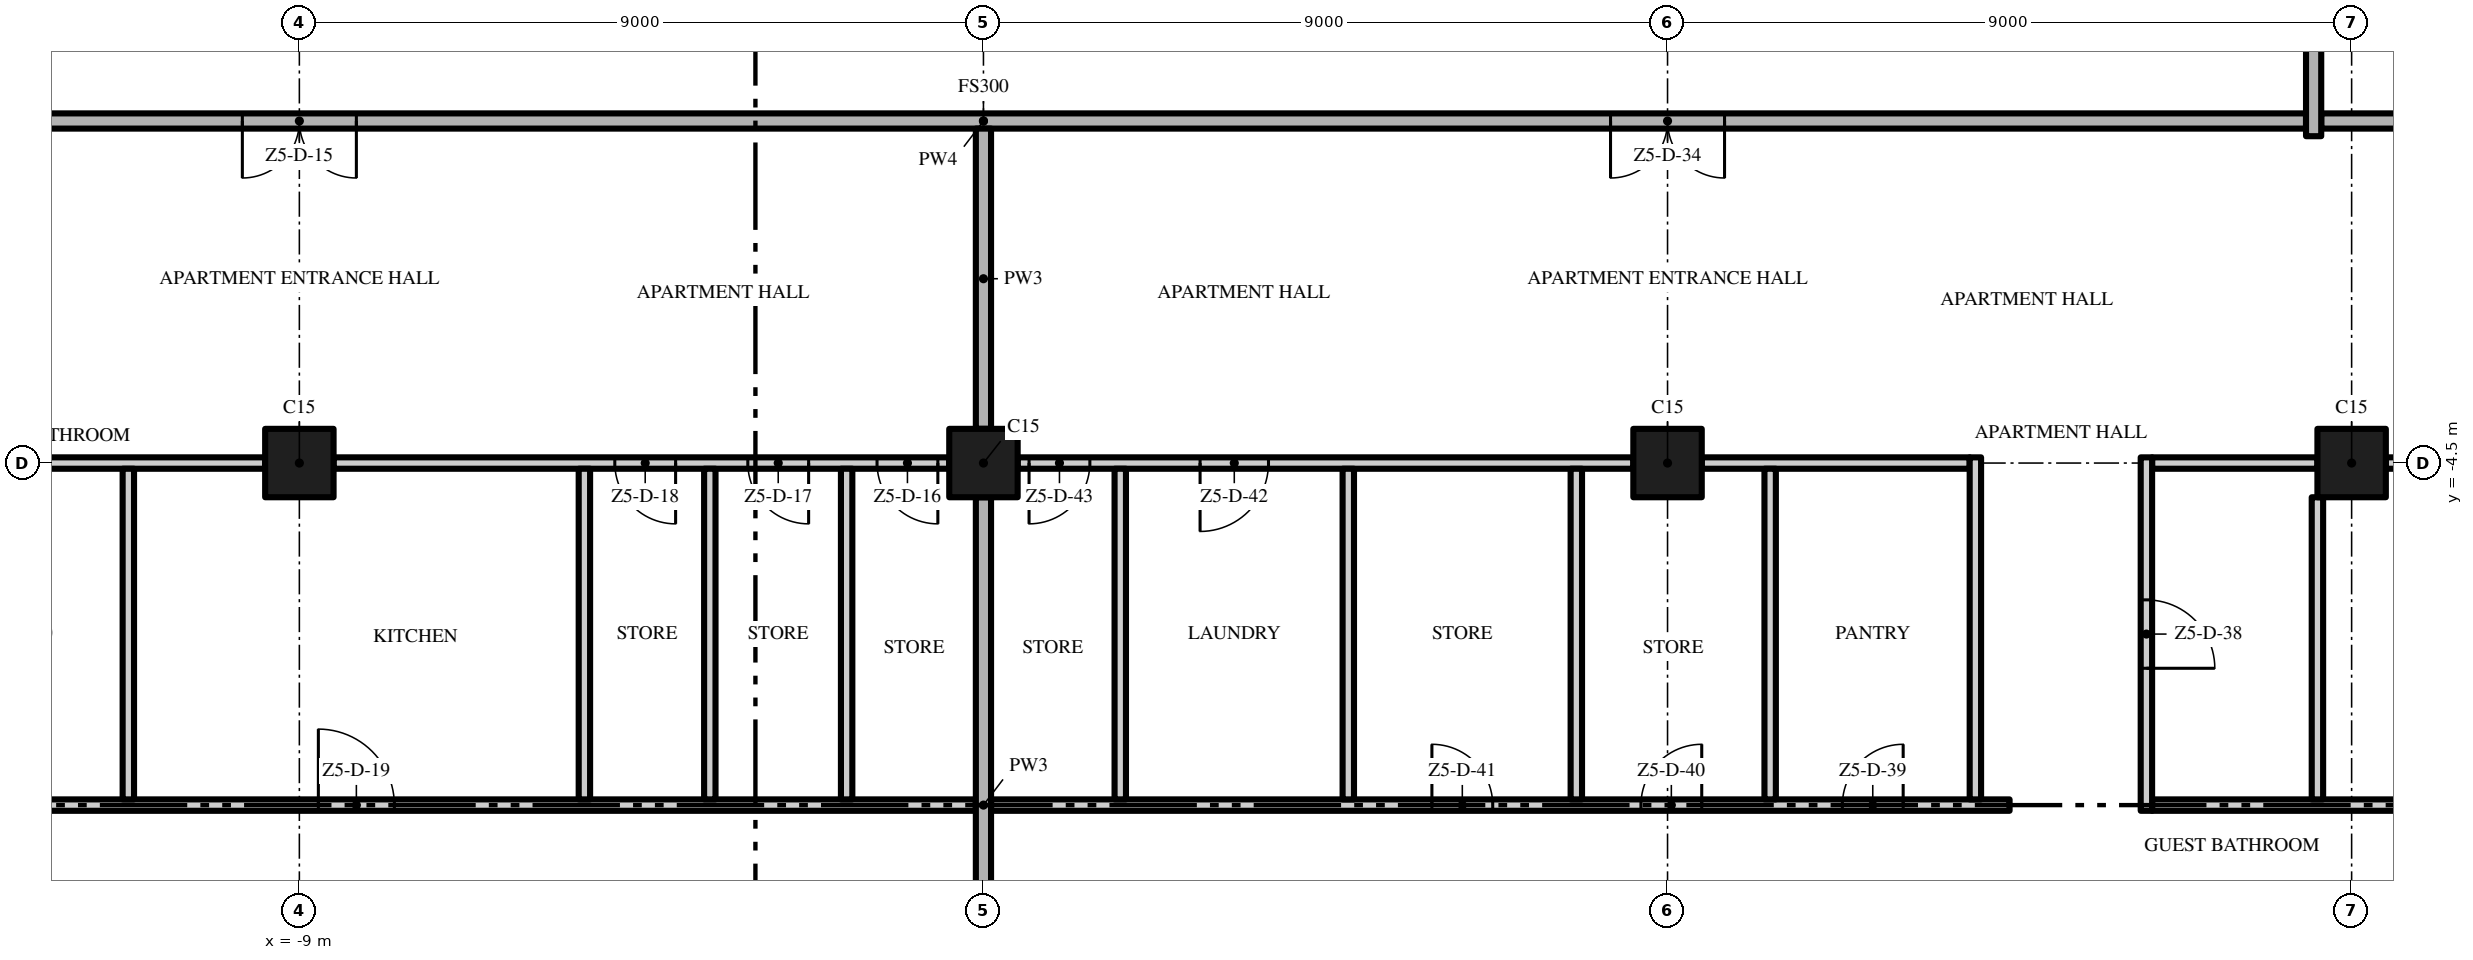
"""IFC4 building model, lengths in metres.
Left out: names, types, materials, properties, quantities, classifications, styles, units other than length and angle.
Written with IfcOpenShell. Run it as: python <this file> out.ifc"""

import sys

from ifc_helpers import new_model, si_unit, direction, frame, frame_2d, origin, origin_2d, place, context, subcontext, project, spatial, rectangle, extrude, element, fill, save


model = new_model("IFC4")
c1 = context("Model", 3, precision=1e-05, world=origin(), true_north=direction((0.0, 1.0)))
c2 = subcontext(c1, "Body", "Model", "MODEL_VIEW")
j1 = project(units=[si_unit("LENGTHUNIT", "METRE"), si_unit("PLANEANGLEUNIT", "RADIAN")], contexts=[c1])
p1 = place(None, origin())
s1 = spatial("IfcSite", under=j1, at=p1, CompositionType="ELEMENT")
p2 = place(p1, origin())
s2 = spatial("IfcBuilding", under=s1, at=p2, CompositionType="ELEMENT")
p3 = place(p2, frame((0.0, 0.0, 276.8)))
s3 = spatial("IfcBuildingStorey", under=s2, at=p3, CompositionType="ELEMENT", Elevation=276.8)
for number, where, z_axis, x_axis in (
    (1, (-9.0, -4.5, 0.0), (0.0, 0.0, 1.0), (1.0, 0.0, 0.0)),
    (2, (0.0, -4.5, 0.0), (0.0, 0.0, 1.0), (1.0, 0.0, 0.0)),
    (3, (18.0, -4.5, 0.0), (0.0, 0.0, 1.0), (1.0, 0.0, 0.0)),
    (4, (9.0, -4.5, 0.0), (0.0, 0.0, 1.0), (1.0, 0.0, 0.0)),
):
    element("IfcColumn", number, at=place(p3, frame(where, z_axis=z_axis, x_axis=x_axis)), inside=s3, PredefinedType="COLUMN", context=c2, shape_type="SweptSolid", body=[
        extrude(rectangle(XDim=0.9, YDim=0.9, at=origin_2d()), origin(), (0.0, 0.0, 1.0), 3.5),
    ])
p4 = place(p3, frame((-13.425, -9.0, 0.0), z_axis=(0.0, 0.0, 1.0), x_axis=(1.0, 0.0, 0.0)))
e5 = element("IfcWall", 5, at=p4, inside=s3, PredefinedType="PARTITIONING", context=c2, shape_type="SweptSolid", body=[
    extrude(rectangle(XDim=13.325, YDim=0.15, at=frame_2d((6.662, 0.0))), origin(), (0.0, 0.0, 1.0), 3.5),
])
p5 = place(p4, frame((4.675, 0.0, 0.0)))
e6 = element("IfcOpeningElement", 6, at=p5, cuts=e5, PredefinedType="OPENING", context=c2, shape_type="SweptSolid", body=[
    extrude(rectangle(XDim=1.0, YDim=2.4, at=frame_2d((0.5, 1.2))), frame((0.0, 0.085, 0.0), z_axis=(0.0, -1.0, 0.0), x_axis=(1.0, 0.0, 0.0)), (0.0, 0.0, 1.0), 0.17),
])
p6 = place(p3, frame((0.1, -9.0, 0.0), z_axis=(0.0, 0.0, 1.0), x_axis=(1.0, 0.0, 0.0)))
e7 = element("IfcWall", 7, at=p6, inside=s3, PredefinedType="PARTITIONING", context=c2, shape_type="SweptSolid", body=[
    extrude(rectangle(XDim=13.4, YDim=0.15, at=frame_2d((6.7, 0.0))), origin(), (0.0, 0.0, 1.0), 3.5),
])
p7 = place(p6, frame((11.2, 0.0, 0.0)))
e8 = element("IfcOpeningElement", 8, at=p7, cuts=e7, PredefinedType="OPENING", context=c2, shape_type="SweptSolid", body=[
    extrude(rectangle(XDim=0.8, YDim=2.0, at=frame_2d((0.4, 1.0))), frame((0.0, 0.085, 0.0), z_axis=(0.0, -1.0, 0.0), x_axis=(1.0, 0.0, 0.0)), (0.0, 0.0, 1.0), 0.17),
])
p8 = place(p6, frame((8.55, 0.0, 0.0)))
e9 = element("IfcOpeningElement", 9, at=p8, cuts=e7, PredefinedType="OPENING", context=c2, shape_type="SweptSolid", body=[
    extrude(rectangle(XDim=0.8, YDim=2.0, at=frame_2d((0.4, 1.0))), frame((0.0, 0.085, 0.0), z_axis=(0.0, -1.0, 0.0), x_axis=(1.0, 0.0, 0.0)), (0.0, 0.0, 1.0), 0.17),
])
p9 = place(p6, frame((5.8, 0.0, 0.0)))
e10 = element("IfcOpeningElement", 10, at=p9, cuts=e7, PredefinedType="OPENING", context=c2, shape_type="SweptSolid", body=[
    extrude(rectangle(XDim=0.8, YDim=2.0, at=frame_2d((0.4, 1.0))), frame((0.0, 0.085, 0.0), z_axis=(0.0, -1.0, 0.0), x_axis=(1.0, 0.0, 0.0)), (0.0, 0.0, 1.0), 0.17),
])
p10 = place(p3, frame((15.375, -9.0, 0.0), z_axis=(0.0, 0.0, 1.0), x_axis=(1.0, 0.0, 0.0)))
e11 = element("IfcWall", 11, at=p10, inside=s3, PredefinedType="PARTITIONING", context=c2, shape_type="SweptSolid", body=[
    extrude(rectangle(XDim=11.325, YDim=0.15, at=frame_2d((5.662, 0.0))), origin(), (0.0, 0.0, 1.0), 3.5),
])
p11 = place(p10, frame((10.325, 0.0, 0.0)))
e12 = element("IfcOpeningElement", 12, at=p11, cuts=e11, PredefinedType="OPENING", context=c2, shape_type="SweptSolid", body=[
    extrude(rectangle(XDim=0.8, YDim=2.0, at=frame_2d((0.4, 1.0))), frame((0.0, 0.085, 0.0), z_axis=(0.0, -1.0, 0.0), x_axis=(1.0, 0.0, 0.0)), (0.0, 0.0, 1.0), 0.17),
])
p12 = place(p3, frame((-13.425, -4.5, 0.0), z_axis=(0.0, 0.0, 1.0), x_axis=(1.0, 0.0, 0.0)))
e13 = element("IfcWall", 13, at=p12, inside=s3, PredefinedType="PARTITIONING", context=c2, shape_type="SweptSolid", body=[
    extrude(rectangle(XDim=3.975, YDim=0.15, at=frame_2d((1.988, 0.0))), origin(), (0.0, 0.0, 1.0), 3.5),
])
p13 = place(p3, frame((-0.45, -4.5, 0.0), z_axis=(0.0, 0.0, 1.0), x_axis=(-1.0, 0.0, 0.0)))
e14 = element("IfcWall", 14, at=p13, inside=s3, PredefinedType="PARTITIONING", context=c2, shape_type="SweptSolid", body=[
    extrude(rectangle(XDim=8.1, YDim=0.15, at=frame_2d((4.05, 0.0))), origin(), (0.0, 0.0, 1.0), 3.5),
])
p14 = place(p13, frame((0.15, 0.0, 0.0)))
e15 = element("IfcOpeningElement", 15, at=p14, cuts=e14, PredefinedType="OPENING", context=c2, shape_type="SweptSolid", body=[
    extrude(rectangle(XDim=0.8, YDim=2.0, at=frame_2d((0.4, 1.0))), frame((0.0, 0.085, 0.0), z_axis=(0.0, -1.0, 0.0), x_axis=(1.0, 0.0, 0.0)), (0.0, 0.0, 1.0), 0.17),
])
p15 = place(p13, frame((1.85, 0.0, 0.0)))
e16 = element("IfcOpeningElement", 16, at=p15, cuts=e14, PredefinedType="OPENING", context=c2, shape_type="SweptSolid", body=[
    extrude(rectangle(XDim=0.8, YDim=2.0, at=frame_2d((0.4, 1.0))), frame((0.0, 0.085, 0.0), z_axis=(0.0, -1.0, 0.0), x_axis=(1.0, 0.0, 0.0)), (0.0, 0.0, 1.0), 0.17),
])
p16 = place(p13, frame((3.6, 0.0, 0.0)))
e17 = element("IfcOpeningElement", 17, at=p16, cuts=e14, PredefinedType="OPENING", context=c2, shape_type="SweptSolid", body=[
    extrude(rectangle(XDim=0.8, YDim=2.0, at=frame_2d((0.4, 1.0))), frame((0.0, 0.085, 0.0), z_axis=(0.0, -1.0, 0.0), x_axis=(1.0, 0.0, 0.0)), (0.0, 0.0, 1.0), 0.17),
])
p17 = place(p3, frame((8.55, -4.5, 0.0), z_axis=(0.0, 0.0, 1.0), x_axis=(-1.0, 0.0, 0.0)))
e18 = element("IfcWall", 18, at=p17, inside=s3, PredefinedType="PARTITIONING", context=c2, shape_type="SweptSolid", body=[
    extrude(rectangle(XDim=8.1, YDim=0.15, at=frame_2d((4.05, 0.0))), origin(), (0.0, 0.0, 1.0), 3.5),
])
p18 = place(p17, frame((4.8, 0.0, 0.0)))
e19 = element("IfcOpeningElement", 19, at=p18, cuts=e18, PredefinedType="OPENING", context=c2, shape_type="SweptSolid", body=[
    extrude(rectangle(XDim=0.9, YDim=2.1, at=frame_2d((0.45, 1.05))), frame((0.0, 0.085, 0.0), z_axis=(0.0, -1.0, 0.0), x_axis=(1.0, 0.0, 0.0)), (0.0, 0.0, 1.0), 0.17),
])
p19 = place(p17, frame((7.15, 0.0, 0.0)))
e20 = element("IfcOpeningElement", 20, at=p19, cuts=e18, PredefinedType="OPENING", context=c2, shape_type="SweptSolid", body=[
    extrude(rectangle(XDim=0.8, YDim=2.0, at=frame_2d((0.4, 1.0))), frame((0.0, 0.085, 0.0), z_axis=(0.0, -1.0, 0.0), x_axis=(1.0, 0.0, 0.0)), (0.0, 0.0, 1.0), 0.17),
])
p20 = place(p3, frame((9.45, -4.5, 0.0), z_axis=(0.0, 0.0, 1.0), x_axis=(1.0, 0.0, 0.0)))
e21 = element("IfcWall", 21, at=p20, inside=s3, PredefinedType="PARTITIONING", context=c2, shape_type="SweptSolid", body=[
    extrude(rectangle(XDim=3.525, YDim=0.15, at=frame_2d((1.762, 0.0))), origin(), (0.0, 0.0, 1.0), 3.5),
])
p21 = place(p3, frame((15.375, -4.5, 0.0), z_axis=(0.0, 0.0, 1.0), x_axis=(1.0, 0.0, 0.0)))
e22 = element("IfcWall", 22, at=p21, inside=s3, PredefinedType="PARTITIONING", context=c2, shape_type="SweptSolid", body=[
    extrude(rectangle(XDim=2.175, YDim=0.15, at=frame_2d((1.087, 0.0))), origin(), (0.0, 0.0, 1.0), 3.5),
])
p22 = place(p3, frame((26.1, -4.5, 0.0), z_axis=(0.0, 0.0, 1.0), x_axis=(-1.0, 0.0, 0.0)))
e23 = element("IfcWall", 23, at=p22, inside=s3, PredefinedType="PARTITIONING", context=c2, shape_type="SweptSolid", body=[
    extrude(rectangle(XDim=7.65, YDim=0.15, at=frame_2d((3.825, 0.0))), origin(), (0.0, 0.0, 1.0), 3.5),
])
p23 = place(p22, frame((1.35, 0.0, 0.0)))
e24 = element("IfcOpeningElement", 24, at=p23, cuts=e23, PredefinedType="OPENING", context=c2, shape_type="SweptSolid", body=[
    extrude(rectangle(XDim=0.8, YDim=2.0, at=frame_2d((0.4, 1.0))), frame((0.0, 0.085, 0.0), z_axis=(0.0, -1.0, 0.0), x_axis=(1.0, 0.0, 0.0)), (0.0, 0.0, 1.0), 0.17),
])
p24 = place(p22, frame((5.05, 0.0, 0.0)))
e25 = element("IfcOpeningElement", 25, at=p24, cuts=e23, PredefinedType="OPENING", context=c2, shape_type="SweptSolid", body=[
    extrude(rectangle(XDim=1.0, YDim=2.4, at=frame_2d((0.5, 1.2))), frame((0.0, 0.085, 0.0), z_axis=(0.0, -1.0, 0.0), x_axis=(1.0, 0.0, 0.0)), (0.0, 0.0, 1.0), 0.17),
])
p25 = place(p3, frame((17.4, 0.0, 0.0), z_axis=(0.0, 0.0, 1.0), x_axis=(-1.0, 0.0, 0.0)))
e26 = element("IfcWall", 26, at=p25, inside=s3, PredefinedType="PARTITIONING", context=c2, shape_type="SweptSolid", body=[
    extrude(rectangle(XDim=34.8, YDim=0.2, at=frame_2d((17.4, 0.0))), origin(), (0.0, 0.0, 1.0), 3.5),
])
p26 = place(p25, frame((25.65, 0.0, 0.0)))
e27 = element("IfcOpeningElement", 27, at=p26, cuts=e26, PredefinedType="OPENING", context=c2, shape_type="SweptSolid", body=[
    extrude(rectangle(XDim=1.5, YDim=2.4, at=frame_2d((0.75, 1.2))), frame((0.0, 0.11, 0.0), z_axis=(0.0, -1.0, 0.0), x_axis=(1.0, 0.0, 0.0)), (0.0, 0.0, 1.0), 0.22),
])
p27 = place(p25, frame((7.65, 0.0, 0.0)))
e28 = element("IfcOpeningElement", 28, at=p27, cuts=e26, PredefinedType="OPENING", context=c2, shape_type="SweptSolid", body=[
    extrude(rectangle(XDim=1.5, YDim=2.4, at=frame_2d((0.75, 1.2))), frame((0.0, 0.11, 0.0), z_axis=(0.0, -1.0, 0.0), x_axis=(1.0, 0.0, 0.0)), (0.0, 0.0, 1.0), 0.22),
])
p28 = place(p3, frame((17.6, 0.0, 0.0), z_axis=(0.0, 0.0, 1.0), x_axis=(1.0, 0.0, 0.0)))
e29 = element("IfcWall", 29, at=p28, inside=s3, PredefinedType="PARTITIONING", context=c2, shape_type="SweptSolid", body=[
    extrude(rectangle(XDim=9.1, YDim=0.2, at=frame_2d((4.55, 0.0))), origin(), (0.0, 0.0, 1.0), 3.5),
])
for number, where, z_axis, x_axis in (
    (30, (-11.25, -8.925, 0.0), (0.0, 0.0, 1.0), (0.0, 1.0, 0.0)),
    (31, (-5.25, -8.925, 0.0), (0.0, 0.0, 1.0), (0.0, 1.0, 0.0)),
    (32, (-3.6, -8.925, 0.0), (0.0, 0.0, 1.0), (0.0, 1.0, 0.0)),
    (33, (-1.8, -8.925, 0.0), (0.0, 0.0, 1.0), (0.0, 1.0, 0.0)),
):
    element("IfcWall", number, at=place(p3, frame(where, z_axis=z_axis, x_axis=x_axis)), inside=s3, PredefinedType="PARTITIONING", context=c2, shape_type="SweptSolid", body=[
        extrude(rectangle(XDim=4.35, YDim=0.15, at=frame_2d((2.175, 0.0))), origin(), (0.0, 0.0, 1.0), 3.5),
    ])
p29 = place(p3, frame((0.0, -13.05, 0.0), z_axis=(0.0, 0.0, 1.0), x_axis=(0.0, 1.0, 0.0)))
e34 = element("IfcWall", 34, at=p29, inside=s3, PredefinedType="PARTITIONING", context=c2, shape_type="SweptSolid", body=[
    extrude(rectangle(XDim=8.1, YDim=0.2, at=frame_2d((4.05, 0.0))), origin(), (0.0, 0.0, 1.0), 3.5),
])
p30 = place(p3, frame((0.0, -4.05, 0.0), z_axis=(0.0, 0.0, 1.0), x_axis=(0.0, 1.0, 0.0)))
e35 = element("IfcWall", 35, at=p30, inside=s3, PredefinedType="PARTITIONING", context=c2, shape_type="SweptSolid", body=[
    extrude(rectangle(XDim=3.95, YDim=0.2, at=frame_2d((1.975, 0.0))), origin(), (0.0, 0.0, 1.0), 3.5),
])
for number, where, z_axis, x_axis in (
    (36, (1.8, -8.925, 0.0), (0.0, 0.0, 1.0), (0.0, 1.0, 0.0)),
    (37, (4.8, -8.925, 0.0), (0.0, 0.0, 1.0), (0.0, 1.0, 0.0)),
    (38, (7.8, -8.925, 0.0), (0.0, 0.0, 1.0), (0.0, 1.0, 0.0)),
    (39, (10.35, -8.925, 0.0), (0.0, 0.0, 1.0), (0.0, 1.0, 0.0)),
):
    element("IfcWall", number, at=place(p3, frame(where, z_axis=z_axis, x_axis=x_axis)), inside=s3, PredefinedType="PARTITIONING", context=c2, shape_type="SweptSolid", body=[
        extrude(rectangle(XDim=4.35, YDim=0.15, at=frame_2d((2.175, 0.0))), origin(), (0.0, 0.0, 1.0), 3.5),
    ])
p31 = place(p3, frame((13.05, -8.925, 0.0), z_axis=(0.0, 0.0, 1.0), x_axis=(0.0, 1.0, 0.0)))
e40 = element("IfcWall", 40, at=p31, inside=s3, PredefinedType="PARTITIONING", context=c2, shape_type="SweptSolid", body=[
    extrude(rectangle(XDim=4.5, YDim=0.15, at=frame_2d((2.25, 0.0))), origin(), (0.0, 0.0, 1.0), 3.5),
])
p32 = place(p3, frame((15.3, -4.425, 0.0), z_axis=(0.0, 0.0, 1.0), x_axis=(0.0, -1.0, 0.0)))
e41 = element("IfcWall", 41, at=p32, inside=s3, PredefinedType="PARTITIONING", context=c2, shape_type="SweptSolid", body=[
    extrude(rectangle(XDim=4.65, YDim=0.15, at=frame_2d((2.325, 0.0))), origin(), (0.0, 0.0, 1.0), 3.5),
])
p33 = place(p32, frame((1.875, 0.0, 0.0)))
e42 = element("IfcOpeningElement", 42, at=p33, cuts=e41, PredefinedType="OPENING", context=c2, shape_type="SweptSolid", body=[
    extrude(rectangle(XDim=0.9, YDim=2.1, at=frame_2d((0.45, 1.05))), frame((0.0, 0.085, 0.0), z_axis=(0.0, -1.0, 0.0), x_axis=(1.0, 0.0, 0.0)), (0.0, 0.0, 1.0), 0.17),
])
p34 = place(p3, frame((17.5, -0.2, 0.0), z_axis=(0.0, 0.0, 1.0), x_axis=(0.0, 1.0, 0.0)))
e43 = element("IfcWall", 43, at=p34, inside=s3, PredefinedType="PARTITIONING", context=c2, shape_type="SweptSolid", body=[
    extrude(rectangle(XDim=4.25, YDim=0.2, at=frame_2d((2.125, 0.0))), origin(), (0.0, 0.0, 1.0), 3.5),
])
p35 = place(p3, frame((17.55, -8.925, 0.0), z_axis=(0.0, 0.0, 1.0), x_axis=(0.0, 1.0, 0.0)))
e44 = element("IfcWall", 44, at=p35, inside=s3, PredefinedType="PARTITIONING", context=c2, shape_type="SweptSolid", body=[
    extrude(rectangle(XDim=3.975, YDim=0.15, at=frame_2d((1.988, 0.0))), origin(), (0.0, 0.0, 1.0), 3.5),
])
p36 = place(p26, origin())
e45 = element("IfcDoor", 45, at=p36, inside=s3, OperationType="DOUBLE_DOOR_SINGLE_SWING", PredefinedType="DOOR", context=c2, shape_type="SweptSolid", body=[
    extrude(rectangle(XDim=1.5, YDim=2.4, at=frame_2d((0.75, 1.2))), frame((0.0, 0.025, 0.0), z_axis=(0.0, -1.0, 0.0), x_axis=(1.0, 0.0, 0.0)), (0.0, 0.0, 1.0), 0.05),
])
fill(e27, e45)
p37 = place(p14, origin())
e46 = element("IfcDoor", 46, at=p37, inside=s3, OperationType="SINGLE_SWING_LEFT", PredefinedType="DOOR", context=c2, shape_type="SweptSolid", body=[
    extrude(rectangle(XDim=0.8, YDim=2.0, at=frame_2d((0.4, 1.0))), frame((0.0, 0.025, 0.0), z_axis=(0.0, -1.0, 0.0), x_axis=(1.0, 0.0, 0.0)), (0.0, 0.0, 1.0), 0.05),
])
fill(e15, e46)
p38 = place(p15, origin())
e47 = element("IfcDoor", 47, at=p38, inside=s3, OperationType="SINGLE_SWING_LEFT", PredefinedType="DOOR", context=c2, shape_type="SweptSolid", body=[
    extrude(rectangle(XDim=0.8, YDim=2.0, at=frame_2d((0.4, 1.0))), frame((0.0, 0.025, 0.0), z_axis=(0.0, -1.0, 0.0), x_axis=(1.0, 0.0, 0.0)), (0.0, 0.0, 1.0), 0.05),
])
fill(e16, e47)
p39 = place(p16, origin())
e48 = element("IfcDoor", 48, at=p39, inside=s3, OperationType="SINGLE_SWING_LEFT", PredefinedType="DOOR", context=c2, shape_type="SweptSolid", body=[
    extrude(rectangle(XDim=0.8, YDim=2.0, at=frame_2d((0.4, 1.0))), frame((0.0, 0.025, 0.0), z_axis=(0.0, -1.0, 0.0), x_axis=(1.0, 0.0, 0.0)), (0.0, 0.0, 1.0), 0.05),
])
fill(e17, e48)
p40 = place(p5, origin())
e49 = element("IfcDoor", 49, at=p40, inside=s3, OperationType="SINGLE_SWING_LEFT", PredefinedType="DOOR", context=c2, shape_type="SweptSolid", body=[
    extrude(rectangle(XDim=1.0, YDim=2.4, at=frame_2d((0.5, 1.2))), frame((0.0, 0.025, 0.0), z_axis=(0.0, -1.0, 0.0), x_axis=(1.0, 0.0, 0.0)), (0.0, 0.0, 1.0), 0.05),
])
fill(e6, e49)
p41 = place(p27, origin())
e50 = element("IfcDoor", 50, at=p41, inside=s3, OperationType="DOUBLE_DOOR_SINGLE_SWING", PredefinedType="DOOR", context=c2, shape_type="SweptSolid", body=[
    extrude(rectangle(XDim=1.5, YDim=2.4, at=frame_2d((0.75, 1.2))), frame((0.0, 0.025, 0.0), z_axis=(0.0, -1.0, 0.0), x_axis=(1.0, 0.0, 0.0)), (0.0, 0.0, 1.0), 0.05),
])
fill(e28, e50)
p42 = place(p33, origin())
e51 = element("IfcDoor", 51, at=p42, inside=s3, OperationType="SINGLE_SWING_RIGHT", PredefinedType="DOOR", context=c2, shape_type="SweptSolid", body=[
    extrude(rectangle(XDim=0.9, YDim=2.1, at=frame_2d((0.45, 1.05))), frame((0.0, 0.025, 0.0), z_axis=(0.0, -1.0, 0.0), x_axis=(1.0, 0.0, 0.0)), (0.0, 0.0, 1.0), 0.05),
])
fill(e42, e51)
p43 = place(p7, origin())
e52 = element("IfcDoor", 52, at=p43, inside=s3, OperationType="SINGLE_SWING_RIGHT", PredefinedType="DOOR", context=c2, shape_type="SweptSolid", body=[
    extrude(rectangle(XDim=0.8, YDim=2.0, at=frame_2d((0.4, 1.0))), frame((0.0, 0.025, 0.0), z_axis=(0.0, -1.0, 0.0), x_axis=(1.0, 0.0, 0.0)), (0.0, 0.0, 1.0), 0.05),
])
fill(e8, e52)
p44 = place(p8, origin())
e53 = element("IfcDoor", 53, at=p44, inside=s3, OperationType="SINGLE_SWING_RIGHT", PredefinedType="DOOR", context=c2, shape_type="SweptSolid", body=[
    extrude(rectangle(XDim=0.8, YDim=2.0, at=frame_2d((0.4, 1.0))), frame((0.0, 0.025, 0.0), z_axis=(0.0, -1.0, 0.0), x_axis=(1.0, 0.0, 0.0)), (0.0, 0.0, 1.0), 0.05),
])
fill(e9, e53)
p45 = place(p9, origin())
e54 = element("IfcDoor", 54, at=p45, inside=s3, OperationType="SINGLE_SWING_LEFT", PredefinedType="DOOR", context=c2, shape_type="SweptSolid", body=[
    extrude(rectangle(XDim=0.8, YDim=2.0, at=frame_2d((0.4, 1.0))), frame((0.0, 0.025, 0.0), z_axis=(0.0, -1.0, 0.0), x_axis=(1.0, 0.0, 0.0)), (0.0, 0.0, 1.0), 0.05),
])
fill(e10, e54)
p46 = place(p18, origin())
e55 = element("IfcDoor", 55, at=p46, inside=s3, OperationType="SINGLE_SWING_RIGHT", PredefinedType="DOOR", context=c2, shape_type="SweptSolid", body=[
    extrude(rectangle(XDim=0.9, YDim=2.1, at=frame_2d((0.45, 1.05))), frame((0.0, 0.025, 0.0), z_axis=(0.0, -1.0, 0.0), x_axis=(1.0, 0.0, 0.0)), (0.0, 0.0, 1.0), 0.05),
])
fill(e19, e55)
p47 = place(p19, origin())
e56 = element("IfcDoor", 56, at=p47, inside=s3, OperationType="SINGLE_SWING_RIGHT", PredefinedType="DOOR", context=c2, shape_type="SweptSolid", body=[
    extrude(rectangle(XDim=0.8, YDim=2.0, at=frame_2d((0.4, 1.0))), frame((0.0, 0.025, 0.0), z_axis=(0.0, -1.0, 0.0), x_axis=(1.0, 0.0, 0.0)), (0.0, 0.0, 1.0), 0.05),
])
fill(e20, e56)
save(model, sys.argv[1])
